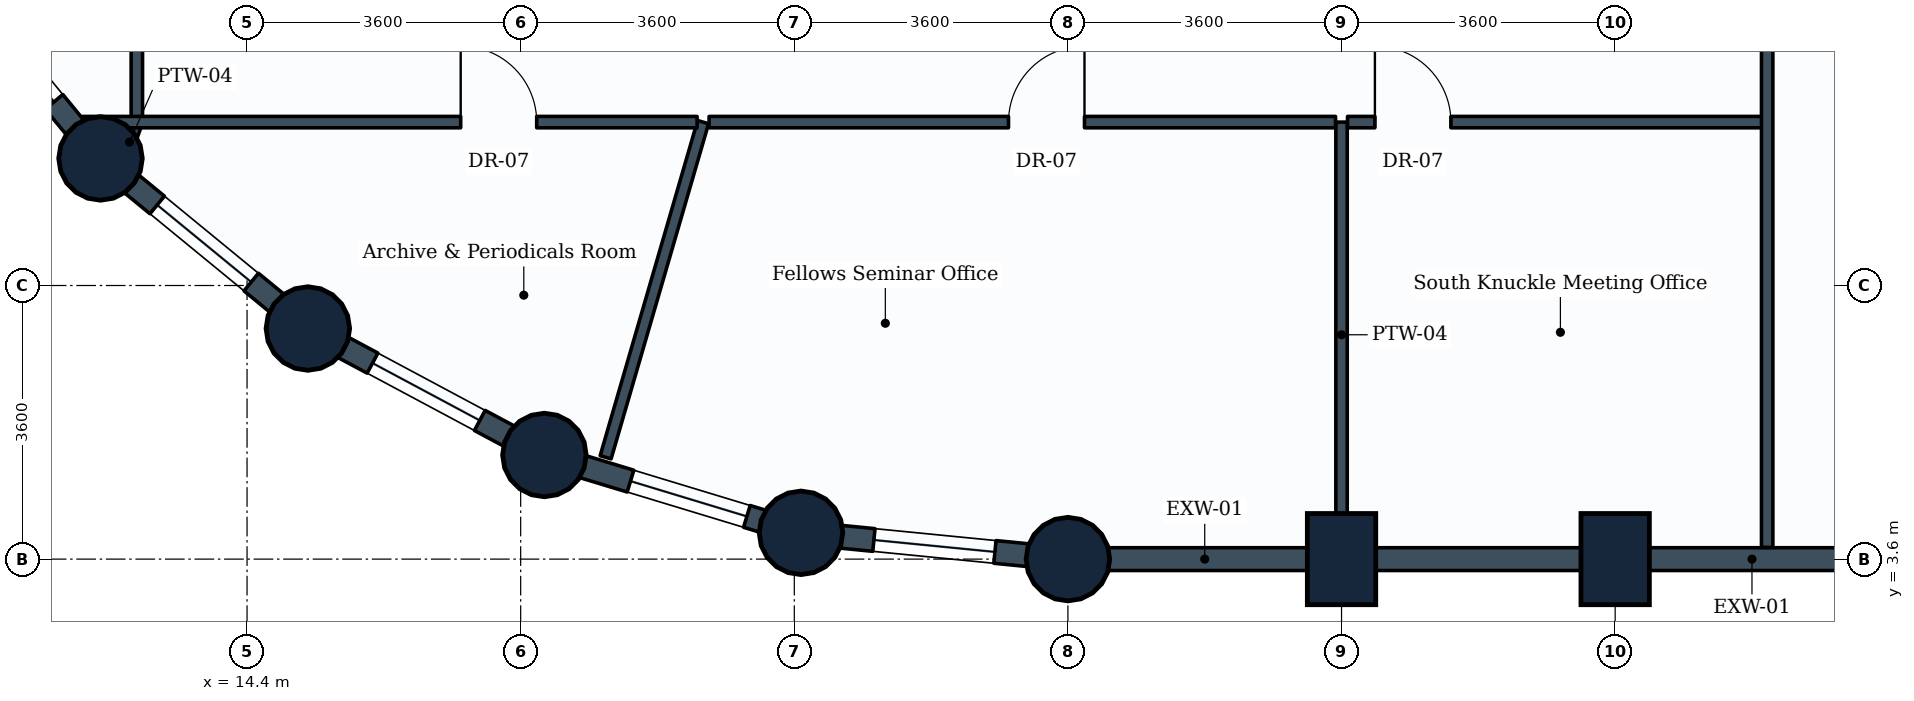
"""IFC4 building model, lengths in metres.
Left out: names, types, materials, properties, quantities, classifications, styles, units other than length and angle.
Written with IfcOpenShell. Run it as: python <this file> out.ifc"""

import sys

from ifc_helpers import new_model, si_unit, direction, frame, frame_2d, origin, origin_2d, place, context, subcontext, project, spatial, rectangle, circle, extrude, element, fill, save


model = new_model("IFC4")
c1 = context("Model", 3, precision=1e-05, world=origin(), true_north=direction((0.0, 1.0)))
c2 = subcontext(c1, "Body", "Model", "MODEL_VIEW")
j1 = project(units=[si_unit("LENGTHUNIT", "METRE"), si_unit("PLANEANGLEUNIT", "RADIAN")], contexts=[c1])
p1 = place(None, origin())
s1 = spatial("IfcSite", under=j1, at=p1, CompositionType="ELEMENT")
p2 = place(p1, origin())
s2 = spatial("IfcBuilding", under=s1, at=p2, CompositionType="ELEMENT")
p3 = place(p2, frame((0.0, 0.0, 43.5)))
s3 = spatial("IfcBuildingStorey", under=s2, at=p3, CompositionType="ELEMENT", Elevation=43.5)
for number, where, z_axis, x_axis in (
    (1, (12.472, 8.872, 0.0), (0.0, 0.0, 1.0), (1.0, 0.0, 0.0)),
    (2, (15.2, 6.634, 0.0), (0.0, 0.0, 1.0), (1.0, 0.0, 0.0)),
    (3, (18.312, 4.97, 0.0), (0.0, 0.0, 1.0), (1.0, 0.0, 0.0)),
    (4, (21.688, 3.946, 0.0), (0.0, 0.0, 1.0), (1.0, 0.0, 0.0)),
    (5, (25.2, 3.6, 0.0), (0.0, 0.0, 1.0), (1.0, 0.0, 0.0)),
):
    element("IfcColumn", number, at=place(p3, frame(where, z_axis=z_axis, x_axis=x_axis)), inside=s3, PredefinedType="COLUMN", context=c2, shape_type="SweptSolid", body=[
        extrude(circle(Radius=0.55, at=origin_2d()), origin(), (0.0, 0.0, 1.0), 3.9),
    ])
for number, where, z_axis, x_axis in (
    (6, (28.8, 3.6, 0.0), (0.0, 0.0, 1.0), (1.0, 0.0, 0.0)),
    (7, (32.4, 3.6, 0.0), (0.0, 0.0, 1.0), (1.0, 0.0, 0.0)),
):
    element("IfcColumn", number, at=place(p3, frame(where, z_axis=z_axis, x_axis=x_axis)), inside=s3, PredefinedType="COLUMN", context=c2, shape_type="SweptSolid", body=[
        extrude(rectangle(XDim=0.9, YDim=1.2, at=origin_2d()), origin(), (0.0, 0.0, 1.0), 3.9),
    ])
p4 = place(p3, frame((28.8, 3.6, 0.0), z_axis=(0.0, 0.0, 1.0), x_axis=(-1.0, 0.0, 0.0)))
e8 = element("IfcWall", 8, at=p4, inside=s3, PredefinedType="STANDARD", context=c2, shape_type="SweptSolid", body=[
    extrude(rectangle(XDim=3.6, YDim=0.3, at=frame_2d((1.8, 0.0))), origin(), (0.0, 0.0, 1.0), 2.93),
])
p5 = place(p3, frame((32.4, 3.6, 0.0), z_axis=(0.0, 0.0, 1.0), x_axis=(-1.0, 0.0, 0.0)))
e9 = element("IfcWall", 9, at=p5, inside=s3, PredefinedType="STANDARD", context=c2, shape_type="SweptSolid", body=[
    extrude(rectangle(XDim=3.6, YDim=0.3, at=frame_2d((1.8, 0.0))), origin(), (0.0, 0.0, 1.0), 2.93),
])
p6 = place(p3, frame((36.0, 3.6, 0.0), z_axis=(0.0, 0.0, 1.0), x_axis=(-1.0, 0.0, 0.0)))
e10 = element("IfcWall", 10, at=p6, inside=s3, PredefinedType="STANDARD", context=c2, shape_type="SweptSolid", body=[
    extrude(rectangle(XDim=3.6, YDim=0.3, at=frame_2d((1.8, 0.0))), origin(), (0.0, 0.0, 1.0), 2.93),
])
p7 = place(p3, frame((12.472, 8.872, 0.0), z_axis=(0.0, 0.0, 1.0), x_axis=(-0.634258295121, 0.773121216285, 0.0)))
e11 = element("IfcWall", 11, at=p7, inside=s3, PredefinedType="STANDARD", context=c2, shape_type="SweptSolid", body=[
    extrude(rectangle(XDim=3.529, YDim=0.3, at=frame_2d((1.764, 0.0))), origin(), (0.0, 0.0, 1.0), 2.93),
])
p8 = place(p7, frame((0.964, 0.0, 0.85)))
e12 = element("IfcOpeningElement", 12, at=p8, cuts=e11, PredefinedType="OPENING", context=c2, shape_type="SweptSolid", body=[
    extrude(rectangle(XDim=1.6, YDim=1.35, at=frame_2d((0.8, 0.675))), frame((0.0, 0.16, 0.0), z_axis=(0.0, -1.0, 0.0), x_axis=(1.0, 0.0, 0.0)), (0.0, 0.0, 1.0), 0.32),
])
p9 = place(p3, frame((15.2, 6.634, 0.0), z_axis=(0.0, 0.0, 1.0), x_axis=(-0.773121216285, 0.634258295121, 0.0)))
e13 = element("IfcWall", 13, at=p9, inside=s3, PredefinedType="STANDARD", context=c2, shape_type="SweptSolid", body=[
    extrude(rectangle(XDim=3.529, YDim=0.3, at=frame_2d((1.764, 0.0))), origin(), (0.0, 0.0, 1.0), 2.93),
])
p10 = place(p9, frame((0.964, 0.0, 0.85)))
e14 = element("IfcOpeningElement", 14, at=p10, cuts=e13, PredefinedType="OPENING", context=c2, shape_type="SweptSolid", body=[
    extrude(rectangle(XDim=1.6, YDim=1.35, at=frame_2d((0.8, 0.675))), frame((0.0, 0.16, 0.0), z_axis=(0.0, -1.0, 0.0), x_axis=(1.0, 0.0, 0.0)), (0.0, 0.0, 1.0), 0.32),
])
p11 = place(p3, frame((18.312, 4.97, 0.0), z_axis=(0.0, 0.0, 1.0), x_axis=(-0.881846862014, 0.471535907389, 0.0)))
e15 = element("IfcWall", 15, at=p11, inside=s3, PredefinedType="STANDARD", context=c2, shape_type="SweptSolid", body=[
    extrude(rectangle(XDim=3.529, YDim=0.3, at=frame_2d((1.765, 0.0))), origin(), (0.0, 0.0, 1.0), 2.93),
])
p12 = place(p11, frame((0.964, 0.0, 0.85)))
e16 = element("IfcOpeningElement", 16, at=p12, cuts=e15, PredefinedType="OPENING", context=c2, shape_type="SweptSolid", body=[
    extrude(rectangle(XDim=1.6, YDim=1.35, at=frame_2d((0.8, 0.675))), frame((0.0, 0.16, 0.0), z_axis=(0.0, -1.0, 0.0), x_axis=(1.0, 0.0, 0.0)), (0.0, 0.0, 1.0), 0.32),
])
p13 = place(p3, frame((21.688, 3.946, 0.0), z_axis=(0.0, 0.0, 1.0), x_axis=(-0.956953367403, 0.290241714123, 0.0)))
e17 = element("IfcWall", 17, at=p13, inside=s3, PredefinedType="STANDARD", context=c2, shape_type="SweptSolid", body=[
    extrude(rectangle(XDim=3.528, YDim=0.3, at=frame_2d((1.764, 0.0))), origin(), (0.0, 0.0, 1.0), 2.93),
])
p14 = place(p13, frame((0.744, 0.0, 0.85)))
e18 = element("IfcOpeningElement", 18, at=p14, cuts=e17, PredefinedType="OPENING", context=c2, shape_type="SweptSolid", body=[
    extrude(rectangle(XDim=1.6, YDim=1.35, at=frame_2d((0.8, 0.675))), frame((0.0, 0.16, 0.0), z_axis=(0.0, -1.0, 0.0), x_axis=(1.0, 0.0, 0.0)), (0.0, 0.0, 1.0), 0.32),
])
p15 = place(p3, frame((25.2, 3.6, 0.0), z_axis=(0.0, 0.0, 1.0), x_axis=(-0.995183369056, 0.098030923459, 0.0)))
e19 = element("IfcWall", 19, at=p15, inside=s3, PredefinedType="STANDARD", context=c2, shape_type="SweptSolid", body=[
    extrude(rectangle(XDim=3.529, YDim=0.3, at=frame_2d((1.765, 0.0))), origin(), (0.0, 0.0, 1.0), 2.93),
])
p16 = place(p15, frame((0.965, 0.0, 0.85)))
e20 = element("IfcOpeningElement", 20, at=p16, cuts=e19, PredefinedType="OPENING", context=c2, shape_type="SweptSolid", body=[
    extrude(rectangle(XDim=1.6, YDim=1.35, at=frame_2d((0.8, 0.675))), frame((0.0, 0.16, 0.0), z_axis=(0.0, -1.0, 0.0), x_axis=(1.0, 0.0, 0.0)), (0.0, 0.0, 1.0), 0.32),
])
p17 = place(p3, frame((28.8, 9.35, 0.0), z_axis=(0.0, 0.0, 1.0), x_axis=(0.0, -1.0, 0.0)))
e21 = element("IfcWall", 21, at=p17, inside=s3, PredefinedType="PARTITIONING", context=c2, shape_type="SweptSolid", body=[
    extrude(rectangle(XDim=5.596, YDim=0.15, at=frame_2d((2.798, 0.0))), origin(), (0.0, 0.0, 1.0), 3.635),
])
p18 = place(p3, frame((12.95, 9.35, 0.0), z_axis=(0.0, 0.0, 1.0), x_axis=(-0.341918365566, -0.939729658619, 0.0)))
e22 = element("IfcWall", 22, at=p18, inside=s3, PredefinedType="PARTITIONING", context=c2, shape_type="SweptSolid", body=[
    extrude(rectangle(XDim=0.559, YDim=0.15, at=frame_2d((0.28, 0.0))), origin(), (0.0, 0.0, 1.0), 2.93),
])
p19 = place(p3, frame((20.4, 9.35, 0.0), z_axis=(0.0, 0.0, 1.0), x_axis=(-0.279120135734, -0.960256189685, 0.0)))
e23 = element("IfcWall", 23, at=p19, inside=s3, PredefinedType="PARTITIONING", context=c2, shape_type="SweptSolid", body=[
    extrude(rectangle(XDim=4.593, YDim=0.15, at=frame_2d((2.296, 0.0))), origin(), (0.0, 0.0, 1.0), 2.93),
])
p20 = place(p3, frame((12.95, 9.35, 0.0), z_axis=(0.0, 0.0, 1.0), x_axis=(0.0, 1.0, 0.0)))
e24 = element("IfcWall", 24, at=p20, inside=s3, PredefinedType="PARTITIONING", context=c2, shape_type="SweptSolid", body=[
    extrude(rectangle(XDim=7.371, YDim=0.15, at=frame_2d((3.686, 0.0))), origin(), (0.0, 0.0, 1.0), 3.04),
])
p21 = place(p20, frame((4.261, 0.0, 0.0)))
e25 = element("IfcOpeningElement", 25, at=p21, cuts=e24, PredefinedType="OPENING", context=c2, shape_type="SweptSolid", body=[
    extrude(rectangle(XDim=1.0, YDim=2.1, at=frame_2d((0.5, 1.05))), frame((0.0, 0.085, 0.0), z_axis=(0.0, -1.0, 0.0), x_axis=(1.0, 0.0, 0.0)), (0.0, 0.0, 1.0), 0.17),
])
p22 = place(p3, frame((12.234, 9.35, 0.0), z_axis=(0.0, 0.0, 1.0), x_axis=(1.0, 0.0, 0.0)))
e26 = element("IfcWall", 26, at=p22, inside=s3, PredefinedType="PARTITIONING", context=c2, shape_type="SweptSolid", body=[
    extrude(rectangle(XDim=8.087, YDim=0.15, at=frame_2d((4.043, 0.0))), origin(), (0.0, 0.0, 1.0), 2.93),
])
p23 = place(p22, frame((4.977, 0.0, 0.0)))
e27 = element("IfcOpeningElement", 27, at=p23, cuts=e26, PredefinedType="OPENING", context=c2, shape_type="SweptSolid", body=[
    extrude(rectangle(XDim=1.0, YDim=2.1, at=frame_2d((0.5, 1.05))), frame((0.0, 0.085, 0.0), z_axis=(0.0, -1.0, 0.0), x_axis=(1.0, 0.0, 0.0)), (0.0, 0.0, 1.0), 0.17),
])
p24 = place(p3, frame((20.479, 9.35, 0.0), z_axis=(0.0, 0.0, 1.0), x_axis=(1.0, 0.0, 0.0)))
e28 = element("IfcWall", 28, at=p24, inside=s3, PredefinedType="PARTITIONING", context=c2, shape_type="SweptSolid", body=[
    extrude(rectangle(XDim=8.242, YDim=0.15, at=frame_2d((4.121, 0.0))), origin(), (0.0, 0.0, 1.0), 3.08),
])
p25 = place(p24, frame((3.939, 0.0, 0.0)))
e29 = element("IfcOpeningElement", 29, at=p25, cuts=e28, PredefinedType="OPENING", context=c2, shape_type="SweptSolid", body=[
    extrude(rectangle(XDim=1.0, YDim=2.1, at=frame_2d((0.5, 1.05))), frame((0.0, 0.085, 0.0), z_axis=(0.0, -1.0, 0.0), x_axis=(1.0, 0.0, 0.0)), (0.0, 0.0, 1.0), 0.17),
])
p26 = place(p3, frame((28.879, 9.35, 0.0), z_axis=(0.0, 0.0, 1.0), x_axis=(1.0, 0.0, 0.0)))
e30 = element("IfcWall", 30, at=p26, inside=s3, PredefinedType="PARTITIONING", context=c2, shape_type="SweptSolid", body=[
    extrude(rectangle(XDim=5.521, YDim=0.15, at=frame_2d((2.76, 0.0))), origin(), (0.0, 0.0, 1.0), 3.635),
])
p27 = place(p26, frame((0.36, 0.0, 0.0)))
e31 = element("IfcOpeningElement", 31, at=p27, cuts=e30, PredefinedType="OPENING", context=c2, shape_type="SweptSolid", body=[
    extrude(rectangle(XDim=1.0, YDim=2.1, at=frame_2d((0.5, 1.05))), frame((0.0, 0.085, 0.0), z_axis=(0.0, -1.0, 0.0), x_axis=(1.0, 0.0, 0.0)), (0.0, 0.0, 1.0), 0.17),
])
p28 = place(p3, frame((34.4, 3.754, 0.0), z_axis=(0.0, 0.0, 1.0), x_axis=(0.0, 1.0, 0.0)))
e32 = element("IfcWall", 32, at=p28, inside=s3, PredefinedType="PARTITIONING", context=c2, shape_type="SweptSolid", body=[
    extrude(rectangle(XDim=12.546, YDim=0.15, at=frame_2d((6.273, 0.0))), origin(), (0.0, 0.0, 1.0), 2.93),
])
p29 = place(p8, origin())
e33 = element("IfcWindow", 33, at=p29, inside=s3, PartitioningType="SINGLE_PANEL", PredefinedType="WINDOW", context=c2, shape_type="SweptSolid", body=[
    extrude(rectangle(XDim=1.6, YDim=1.35, at=frame_2d((0.8, 0.675))), frame((0.0, 0.03, 0.0), z_axis=(0.0, -1.0, 0.0), x_axis=(1.0, 0.0, 0.0)), (0.0, 0.0, 1.0), 0.06),
])
fill(e12, e33)
p30 = place(p10, origin())
e34 = element("IfcWindow", 34, at=p30, inside=s3, PartitioningType="SINGLE_PANEL", PredefinedType="WINDOW", context=c2, shape_type="SweptSolid", body=[
    extrude(rectangle(XDim=1.6, YDim=1.35, at=frame_2d((0.8, 0.675))), frame((0.0, 0.03, 0.0), z_axis=(0.0, -1.0, 0.0), x_axis=(1.0, 0.0, 0.0)), (0.0, 0.0, 1.0), 0.06),
])
fill(e14, e34)
p31 = place(p12, origin())
e35 = element("IfcWindow", 35, at=p31, inside=s3, PartitioningType="SINGLE_PANEL", PredefinedType="WINDOW", context=c2, shape_type="SweptSolid", body=[
    extrude(rectangle(XDim=1.6, YDim=1.35, at=frame_2d((0.8, 0.675))), frame((0.0, 0.03, 0.0), z_axis=(0.0, -1.0, 0.0), x_axis=(1.0, 0.0, 0.0)), (0.0, 0.0, 1.0), 0.06),
])
fill(e16, e35)
p32 = place(p14, origin())
e36 = element("IfcWindow", 36, at=p32, inside=s3, PartitioningType="SINGLE_PANEL", PredefinedType="WINDOW", context=c2, shape_type="SweptSolid", body=[
    extrude(rectangle(XDim=1.6, YDim=1.35, at=frame_2d((0.8, 0.675))), frame((0.0, 0.03, 0.0), z_axis=(0.0, -1.0, 0.0), x_axis=(1.0, 0.0, 0.0)), (0.0, 0.0, 1.0), 0.06),
])
fill(e18, e36)
p33 = place(p16, origin())
e37 = element("IfcWindow", 37, at=p33, inside=s3, PartitioningType="SINGLE_PANEL", PredefinedType="WINDOW", context=c2, shape_type="SweptSolid", body=[
    extrude(rectangle(XDim=1.6, YDim=1.35, at=frame_2d((0.8, 0.675))), frame((0.0, 0.03, 0.0), z_axis=(0.0, -1.0, 0.0), x_axis=(1.0, 0.0, 0.0)), (0.0, 0.0, 1.0), 0.06),
])
fill(e20, e37)
p34 = place(p23, origin())
e38 = element("IfcDoor", 38, at=p34, inside=s3, OperationType="SINGLE_SWING_LEFT", PredefinedType="DOOR", context=c2, shape_type="SweptSolid", body=[
    extrude(rectangle(XDim=1.0, YDim=2.1, at=frame_2d((0.5, 1.05))), frame((0.0, 0.025, 0.0), z_axis=(0.0, -1.0, 0.0), x_axis=(1.0, 0.0, 0.0)), (0.0, 0.0, 1.0), 0.05),
])
fill(e27, e38)
p35 = place(p25, origin())
e39 = element("IfcDoor", 39, at=p35, inside=s3, OperationType="SINGLE_SWING_RIGHT", PredefinedType="DOOR", context=c2, shape_type="SweptSolid", body=[
    extrude(rectangle(XDim=1.0, YDim=2.1, at=frame_2d((0.5, 1.05))), frame((0.0, 0.025, 0.0), z_axis=(0.0, -1.0, 0.0), x_axis=(1.0, 0.0, 0.0)), (0.0, 0.0, 1.0), 0.05),
])
fill(e29, e39)
p36 = place(p27, origin())
e40 = element("IfcDoor", 40, at=p36, inside=s3, OperationType="SINGLE_SWING_LEFT", PredefinedType="DOOR", context=c2, shape_type="SweptSolid", body=[
    extrude(rectangle(XDim=1.0, YDim=2.1, at=frame_2d((0.5, 1.05))), frame((0.0, 0.025, 0.0), z_axis=(0.0, -1.0, 0.0), x_axis=(1.0, 0.0, 0.0)), (0.0, 0.0, 1.0), 0.05),
])
fill(e31, e40)
save(model, sys.argv[1])
